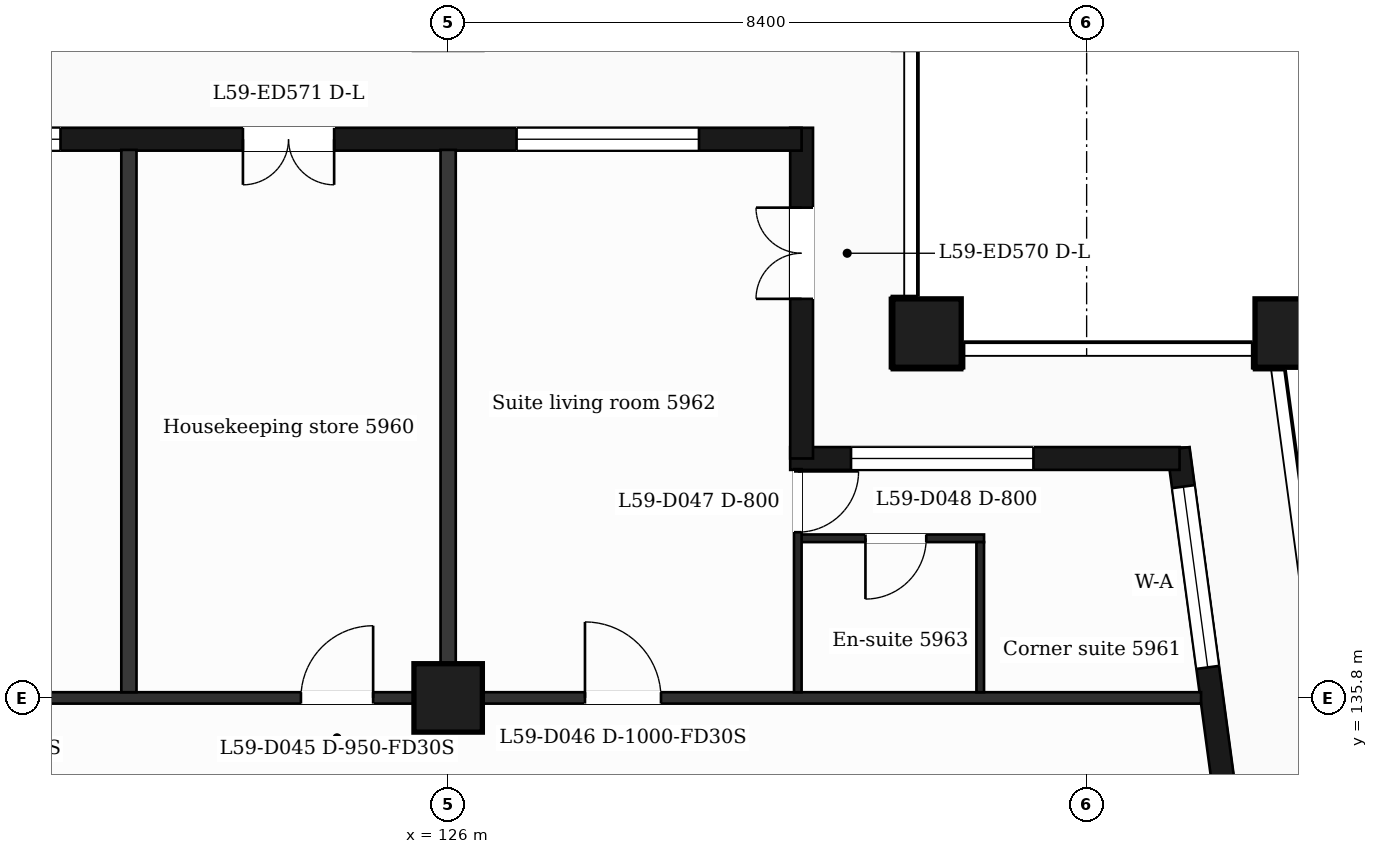
"""IFC4 building model, lengths in metres.
Left out: names, types, materials, properties, quantities, classifications, styles, units other than length and angle.
Written with IfcOpenShell. Run it as: python <this file> out.ifc"""

import sys

from ifc_helpers import new_model, si_unit, direction, frame, frame_2d, origin, origin_2d, place, context, subcontext, project, spatial, rectangle, extrude, element, fill, save


model = new_model("IFC4")
c1 = context("Model", 3, precision=1e-05, world=origin(), true_north=direction((0.0, 1.0)))
c2 = subcontext(c1, "Body", "Model", "MODEL_VIEW")
j1 = project(units=[si_unit("LENGTHUNIT", "METRE"), si_unit("PLANEANGLEUNIT", "RADIAN")], contexts=[c1])
p1 = place(None, origin())
s1 = spatial("IfcSite", under=j1, at=p1, CompositionType="ELEMENT")
p2 = place(p1, origin())
s2 = spatial("IfcBuilding", under=s1, at=p2, CompositionType="ELEMENT")
p3 = place(p2, frame((0.0, 0.0, 242.9)))
s3 = spatial("IfcBuildingStorey", under=s2, at=p3, CompositionType="ELEMENT", Elevation=242.9)
for number, where, z_axis, x_axis in (
    (1, (132.3, 140.6, 0.0), (0.0, 0.0, 1.0), (1.0, 0.0, 0.0)),
    (2, (137.065, 140.6, 0.0), (0.0, 0.0, 1.0), (1.0, 0.0, 0.0)),
    (3, (126.0, 135.8, 0.0), (0.0, 0.0, 1.0), (1.0, 0.0, 0.0)),
):
    element("IfcColumn", number, at=place(p3, frame(where, z_axis=z_axis, x_axis=x_axis)), inside=s3, PredefinedType="COLUMN", context=c2, shape_type="SweptSolid", body=[
        extrude(rectangle(XDim=0.9, YDim=0.9, at=origin_2d()), origin(), (0.0, 0.0, 1.0), 3.7),
    ])
p4 = place(p3, frame((136.504, 132.4, 0.0), z_axis=(0.0, 0.0, 1.0), x_axis=(-0.133399697462, 0.99106231929, 0.0)))
e4 = element("IfcWall", 4, at=p4, inside=s3, PredefinedType="SOLIDWALL", context=c2, shape_type="SweptSolid", body=[
    extrude(rectangle(XDim=6.74, YDim=0.3, at=frame_2d((3.37, 0.0))), origin(), (0.0, 0.0, 1.0), 3.2),
])
p5 = place(p4, frame((1.115, 0.0, 0.0)))
e5 = element("IfcOpeningElement", 5, at=p5, cuts=e4, PredefinedType="OPENING", context=c2, shape_type="SweptSolid", body=[
    extrude(rectangle(XDim=1.2, YDim=2.4, at=frame_2d((0.6, 1.2))), frame((0.0, 0.16, 0.0), z_axis=(0.0, -1.0, 0.0), x_axis=(1.0, 0.0, 0.0)), (0.0, 0.0, 1.0), 0.32),
])
p6 = place(p4, frame((3.835, 0.0, 0.9)))
e6 = element("IfcOpeningElement", 6, at=p6, cuts=e4, PredefinedType="OPENING", context=c2, shape_type="SweptSolid", body=[
    extrude(rectangle(XDim=2.4, YDim=2.1, at=frame_2d((1.2, 1.05))), frame((0.0, 0.16, 0.0), z_axis=(0.0, -1.0, 0.0), x_axis=(1.0, 0.0, 0.0)), (0.0, 0.0, 1.0), 0.32),
])
p7 = place(p3, frame((135.623, 138.95, 0.0), z_axis=(0.0, 0.0, 1.0), x_axis=(-1.0, 0.0, 0.0)))
e7 = element("IfcWall", 7, at=p7, inside=s3, PredefinedType="SOLIDWALL", context=c2, shape_type="SweptSolid", body=[
    extrude(rectangle(XDim=5.123, YDim=0.3, at=frame_2d((2.561, 0.0))), origin(), (0.0, 0.0, 1.0), 3.2),
])
p8 = place(p7, frame((1.923, 0.0, 0.9)))
e8 = element("IfcOpeningElement", 8, at=p8, cuts=e7, PredefinedType="OPENING", context=c2, shape_type="SweptSolid", body=[
    extrude(rectangle(XDim=2.4, YDim=2.1, at=frame_2d((1.2, 1.05))), frame((0.0, 0.16, 0.0), z_axis=(0.0, -1.0, 0.0), x_axis=(1.0, 0.0, 0.0)), (0.0, 0.0, 1.0), 0.32),
])
p9 = place(p3, frame((130.65, 138.95, 0.0), z_axis=(0.0, 0.0, 1.0), x_axis=(0.0, 1.0, 0.0)))
e9 = element("IfcWall", 9, at=p9, inside=s3, PredefinedType="SOLIDWALL", context=c2, shape_type="SweptSolid", body=[
    extrude(rectangle(XDim=4.35, YDim=0.3, at=frame_2d((2.175, 0.0))), origin(), (0.0, 0.0, 1.0), 3.2),
])
p10 = place(p9, frame((2.1, 0.0, 0.0)))
e10 = element("IfcOpeningElement", 10, at=p10, cuts=e9, PredefinedType="OPENING", context=c2, shape_type="SweptSolid", body=[
    extrude(rectangle(XDim=1.2, YDim=2.4, at=frame_2d((0.6, 1.2))), frame((0.0, 0.16, 0.0), z_axis=(0.0, -1.0, 0.0), x_axis=(1.0, 0.0, 0.0)), (0.0, 0.0, 1.0), 0.32),
])
p11 = place(p3, frame((130.65, 143.15, 0.0), z_axis=(0.0, 0.0, 1.0), x_axis=(-1.0, 0.0, 0.0)))
e11 = element("IfcWall", 11, at=p11, inside=s3, PredefinedType="SOLIDWALL", context=c2, shape_type="SweptSolid", body=[
    extrude(rectangle(XDim=14.25, YDim=0.3, at=frame_2d((7.125, 0.0))), origin(), (0.0, 0.0, 1.0), 3.2),
])
p12 = place(p11, frame((1.35, 0.0, 0.9)))
e12 = element("IfcOpeningElement", 12, at=p12, cuts=e11, PredefinedType="OPENING", context=c2, shape_type="SweptSolid", body=[
    extrude(rectangle(XDim=2.4, YDim=2.1, at=frame_2d((1.2, 1.05))), frame((0.0, 0.16, 0.0), z_axis=(0.0, -1.0, 0.0), x_axis=(1.0, 0.0, 0.0)), (0.0, 0.0, 1.0), 0.32),
])
p13 = place(p11, frame((6.15, 0.0, 0.0)))
e13 = element("IfcOpeningElement", 13, at=p13, cuts=e11, PredefinedType="OPENING", context=c2, shape_type="SweptSolid", body=[
    extrude(rectangle(XDim=1.2, YDim=2.4, at=frame_2d((0.6, 1.2))), frame((0.0, 0.16, 0.0), z_axis=(0.0, -1.0, 0.0), x_axis=(1.0, 0.0, 0.0)), (0.0, 0.0, 1.0), 0.32),
])
p14 = place(p11, frame((9.75, 0.0, 0.9)))
e14 = element("IfcOpeningElement", 14, at=p14, cuts=e11, PredefinedType="OPENING", context=c2, shape_type="SweptSolid", body=[
    extrude(rectangle(XDim=2.4, YDim=2.1, at=frame_2d((1.2, 1.05))), frame((0.0, 0.16, 0.0), z_axis=(0.0, -1.0, 0.0), x_axis=(1.0, 0.0, 0.0)), (0.0, 0.0, 1.0), 0.32),
])
p15 = place(p3, frame((90.895, 135.8, 0.0), z_axis=(0.0, 0.0, 1.0), x_axis=(1.0, 0.0, 0.0)))
e15 = element("IfcWall", 15, at=p15, inside=s3, PredefinedType="PARTITIONING", context=c2, shape_type="SweptSolid", body=[
    extrude(rectangle(XDim=45.011, YDim=0.15, at=frame_2d((22.505, 0.0))), origin(), (0.0, 0.0, 1.0), 3.2),
])
p16 = place(p15, frame((7.455, 0.0, 0.0)))
e16 = element("IfcOpeningElement", 16, at=p16, cuts=e15, PredefinedType="OPENING", context=c2, shape_type="SweptSolid", body=[
    extrude(rectangle(XDim=1.0, YDim=2.1, at=frame_2d((0.5, 1.05))), frame((0.0, 0.085, 0.0), z_axis=(0.0, -1.0, 0.0), x_axis=(1.0, 0.0, 0.0)), (0.0, 0.0, 1.0), 0.17),
])
p17 = place(p15, frame((10.88, 0.0, 0.0)))
e17 = element("IfcOpeningElement", 17, at=p17, cuts=e15, PredefinedType="OPENING", context=c2, shape_type="SweptSolid", body=[
    extrude(rectangle(XDim=1.0, YDim=2.1, at=frame_2d((0.5, 1.05))), frame((0.0, 0.085, 0.0), z_axis=(0.0, -1.0, 0.0), x_axis=(1.0, 0.0, 0.0)), (0.0, 0.0, 1.0), 0.17),
])
p18 = place(p15, frame((27.88, 0.0, 0.0)))
e18 = element("IfcOpeningElement", 18, at=p18, cuts=e15, PredefinedType="OPENING", context=c2, shape_type="SweptSolid", body=[
    extrude(rectangle(XDim=1.0, YDim=2.1, at=frame_2d((0.5, 1.05))), frame((0.0, 0.085, 0.0), z_axis=(0.0, -1.0, 0.0), x_axis=(1.0, 0.0, 0.0)), (0.0, 0.0, 1.0), 0.17),
])
p19 = place(p15, frame((33.168, 0.0, 0.0)))
e19 = element("IfcOpeningElement", 19, at=p19, cuts=e15, PredefinedType="OPENING", context=c2, shape_type="SweptSolid", body=[
    extrude(rectangle(XDim=0.95, YDim=2.1, at=frame_2d((0.475, 1.05))), frame((0.0, 0.085, 0.0), z_axis=(0.0, -1.0, 0.0), x_axis=(1.0, 0.0, 0.0)), (0.0, 0.0, 1.0), 0.17),
])
p20 = place(p15, frame((36.906, 0.0, 0.0)))
e20 = element("IfcOpeningElement", 20, at=p20, cuts=e15, PredefinedType="OPENING", context=c2, shape_type="SweptSolid", body=[
    extrude(rectangle(XDim=1.0, YDim=2.1, at=frame_2d((0.5, 1.05))), frame((0.0, 0.085, 0.0), z_axis=(0.0, -1.0, 0.0), x_axis=(1.0, 0.0, 0.0)), (0.0, 0.0, 1.0), 0.17),
])
p21 = place(p3, frame((130.6, 137.9, 0.0), z_axis=(0.0, 0.0, 1.0), x_axis=(1.0, 0.0, 0.0)))
e21 = element("IfcWall", 21, at=p21, inside=s3, PredefinedType="PARTITIONING", context=c2, shape_type="SweptSolid", body=[
    extrude(rectangle(XDim=2.45, YDim=0.1, at=frame_2d((1.225, 0.0))), origin(), (0.0, 0.0, 1.0), 3.2),
])
p22 = place(p21, frame((0.89, 0.0, 0.0)))
e22 = element("IfcOpeningElement", 22, at=p22, cuts=e21, PredefinedType="OPENING", context=c2, shape_type="SweptSolid", body=[
    extrude(rectangle(XDim=0.8, YDim=2.1, at=frame_2d((0.4, 1.05))), frame((0.0, 0.06, 0.0), z_axis=(0.0, -1.0, 0.0), x_axis=(1.0, 0.0, 0.0)), (0.0, 0.0, 1.0), 0.12),
])
for number, where, z_axis, x_axis in (
    (23, (121.8, 135.875, 0.0), (0.0, 0.0, 1.0), (0.0, 1.0, 0.0)),
    (24, (126.0, 135.875, 0.0), (0.0, 0.0, 1.0), (0.0, 1.0, 0.0)),
):
    element("IfcWall", number, at=place(p3, frame(where, z_axis=z_axis, x_axis=x_axis)), inside=s3, PredefinedType="PARTITIONING", context=c2, shape_type="SweptSolid", body=[
        extrude(rectangle(XDim=7.135, YDim=0.2, at=frame_2d((3.567, 0.0))), origin(), (0.0, 0.0, 1.0), 3.2),
    ])
p23 = place(p3, frame((130.6, 135.875, 0.0), z_axis=(0.0, 0.0, 1.0), x_axis=(0.0, 1.0, 0.0)))
e25 = element("IfcWall", 25, at=p23, inside=s3, PredefinedType="PARTITIONING", context=c2, shape_type="SweptSolid", body=[
    extrude(rectangle(XDim=2.935, YDim=0.1, at=frame_2d((1.468, 0.0))), origin(), (0.0, 0.0, 1.0), 3.2),
])
p24 = place(p23, frame((2.105, 0.0, 0.0)))
e26 = element("IfcOpeningElement", 26, at=p24, cuts=e25, PredefinedType="OPENING", context=c2, shape_type="SweptSolid", body=[
    extrude(rectangle(XDim=0.8, YDim=2.1, at=frame_2d((0.4, 1.05))), frame((0.0, 0.06, 0.0), z_axis=(0.0, -1.0, 0.0), x_axis=(1.0, 0.0, 0.0)), (0.0, 0.0, 1.0), 0.12),
])
p25 = place(p3, frame((133.0, 135.875, 0.0), z_axis=(0.0, 0.0, 1.0), x_axis=(0.0, 1.0, 0.0)))
e27 = element("IfcWall", 27, at=p25, inside=s3, PredefinedType="PARTITIONING", context=c2, shape_type="SweptSolid", body=[
    extrude(rectangle(XDim=1.975, YDim=0.1, at=frame_2d((0.988, 0.0))), origin(), (0.0, 0.0, 1.0), 3.2),
])
p26 = place(p6, origin())
e28 = element("IfcWindow", 28, at=p26, inside=s3, PartitioningType="SINGLE_PANEL", PredefinedType="WINDOW", context=c2, shape_type="SweptSolid", body=[
    extrude(rectangle(XDim=2.4, YDim=2.1, at=frame_2d((1.2, 1.05))), frame((0.0, 0.03, 0.0), z_axis=(0.0, -1.0, 0.0), x_axis=(1.0, 0.0, 0.0)), (0.0, 0.0, 1.0), 0.06),
])
fill(e6, e28)
p27 = place(p8, origin())
e29 = element("IfcWindow", 29, at=p27, inside=s3, PartitioningType="SINGLE_PANEL", PredefinedType="WINDOW", context=c2, shape_type="SweptSolid", body=[
    extrude(rectangle(XDim=2.4, YDim=2.1, at=frame_2d((1.2, 1.05))), frame((0.0, 0.03, 0.0), z_axis=(0.0, -1.0, 0.0), x_axis=(1.0, 0.0, 0.0)), (0.0, 0.0, 1.0), 0.06),
])
fill(e8, e29)
p28 = place(p10, origin())
e30 = element("IfcDoor", 30, at=p28, inside=s3, OperationType="DOUBLE_DOOR_SINGLE_SWING", PredefinedType="DOOR", context=c2, shape_type="SweptSolid", body=[
    extrude(rectangle(XDim=1.2, YDim=2.4, at=frame_2d((0.6, 1.2))), frame((0.0, 0.025, 0.0), z_axis=(0.0, -1.0, 0.0), x_axis=(1.0, 0.0, 0.0)), (0.0, 0.0, 1.0), 0.05),
])
fill(e10, e30)
p29 = place(p12, origin())
e31 = element("IfcWindow", 31, at=p29, inside=s3, PartitioningType="SINGLE_PANEL", PredefinedType="WINDOW", context=c2, shape_type="SweptSolid", body=[
    extrude(rectangle(XDim=2.4, YDim=2.1, at=frame_2d((1.2, 1.05))), frame((0.0, 0.03, 0.0), z_axis=(0.0, -1.0, 0.0), x_axis=(1.0, 0.0, 0.0)), (0.0, 0.0, 1.0), 0.06),
])
fill(e12, e31)
p30 = place(p13, origin())
e32 = element("IfcDoor", 32, at=p30, inside=s3, OperationType="DOUBLE_DOOR_SINGLE_SWING", PredefinedType="DOOR", context=c2, shape_type="SweptSolid", body=[
    extrude(rectangle(XDim=1.2, YDim=2.4, at=frame_2d((0.6, 1.2))), frame((0.0, 0.025, 0.0), z_axis=(0.0, -1.0, 0.0), x_axis=(1.0, 0.0, 0.0)), (0.0, 0.0, 1.0), 0.05),
])
fill(e13, e32)
p31 = place(p14, origin())
e33 = element("IfcWindow", 33, at=p31, inside=s3, PartitioningType="SINGLE_PANEL", PredefinedType="WINDOW", context=c2, shape_type="SweptSolid", body=[
    extrude(rectangle(XDim=2.4, YDim=2.1, at=frame_2d((1.2, 1.05))), frame((0.0, 0.03, 0.0), z_axis=(0.0, -1.0, 0.0), x_axis=(1.0, 0.0, 0.0)), (0.0, 0.0, 1.0), 0.06),
])
fill(e14, e33)
p32 = place(p19, origin())
e34 = element("IfcDoor", 34, at=p32, inside=s3, OperationType="SINGLE_SWING_RIGHT", PredefinedType="DOOR", context=c2, shape_type="SweptSolid", body=[
    extrude(rectangle(XDim=0.95, YDim=2.1, at=frame_2d((0.475, 1.05))), frame((0.0, 0.025, 0.0), z_axis=(0.0, -1.0, 0.0), x_axis=(1.0, 0.0, 0.0)), (0.0, 0.0, 1.0), 0.05),
])
fill(e19, e34)
p33 = place(p20, origin())
e35 = element("IfcDoor", 35, at=p33, inside=s3, OperationType="SINGLE_SWING_LEFT", PredefinedType="DOOR", context=c2, shape_type="SweptSolid", body=[
    extrude(rectangle(XDim=1.0, YDim=2.1, at=frame_2d((0.5, 1.05))), frame((0.0, 0.025, 0.0), z_axis=(0.0, -1.0, 0.0), x_axis=(1.0, 0.0, 0.0)), (0.0, 0.0, 1.0), 0.05),
])
fill(e20, e35)
p34 = place(p24, origin())
e36 = element("IfcDoor", 36, at=p34, inside=s3, OperationType="SINGLE_SWING_RIGHT", PredefinedType="DOOR", context=c2, shape_type="SweptSolid", body=[
    extrude(rectangle(XDim=0.8, YDim=2.1, at=frame_2d((0.4, 1.05))), frame((0.0, 0.025, 0.0), z_axis=(0.0, -1.0, 0.0), x_axis=(1.0, 0.0, 0.0)), (0.0, 0.0, 1.0), 0.05),
])
fill(e26, e36)
p35 = place(p22, origin())
e37 = element("IfcDoor", 37, at=p35, inside=s3, OperationType="SINGLE_SWING_LEFT", PredefinedType="DOOR", context=c2, shape_type="SweptSolid", body=[
    extrude(rectangle(XDim=0.8, YDim=2.1, at=frame_2d((0.4, 1.05))), frame((0.0, 0.025, 0.0), z_axis=(0.0, -1.0, 0.0), x_axis=(1.0, 0.0, 0.0)), (0.0, 0.0, 1.0), 0.05),
])
fill(e22, e37)
save(model, sys.argv[1])
